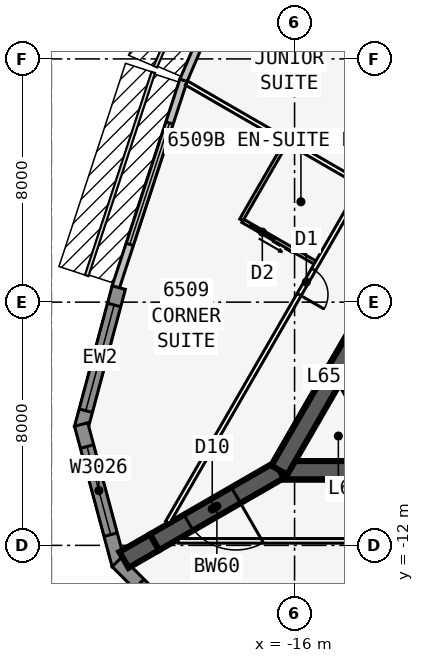
"""IFC4 building model, lengths in metres.
Left out: names, types, materials, properties, quantities, classifications, styles, units other than length and angle.
Written with IfcOpenShell. Run it as: python <this file> out.ifc"""

import sys

from ifc_helpers import new_model, si_unit, direction, frame, frame_2d, origin, place, context, subcontext, project, spatial, polyline, rectangle, outline, extrude, element, fill, save


model = new_model("IFC4")
c1 = context("Model", 3, precision=1e-05, world=origin(), true_north=direction((0.0, 1.0)))
c2 = subcontext(c1, "Body", "Model", "MODEL_VIEW")
j1 = project(units=[si_unit("LENGTHUNIT", "METRE"), si_unit("PLANEANGLEUNIT", "RADIAN")], contexts=[c1])
p1 = place(None, origin())
s1 = spatial("IfcSite", under=j1, at=p1, CompositionType="ELEMENT")
p2 = place(p1, origin())
s2 = spatial("IfcBuilding", under=s1, at=p2, CompositionType="ELEMENT")
p3 = place(p2, frame((0.0, 0.0, 246.5)))
s3 = spatial("IfcBuildingStorey", under=s2, at=p3, CompositionType="ELEMENT", Elevation=246.5)
p4 = place(p3, frame((-16.5, -9.526, 0.0), z_axis=(0.0, 0.0, 1.0), x_axis=(1.0, 0.0, 0.0)))
e1 = element("IfcWall", 1, at=p4, inside=s3, PredefinedType="SHEAR", context=c2, shape_type="SweptSolid", body=[
    extrude(rectangle(XDim=33.0, YDim=0.6, at=frame_2d((16.5, 0.0))), origin(), (0.0, 0.0, 1.0), 3.6),
])
p5 = place(p4, frame((14.05, 0.0, 0.0)))
e2 = element("IfcOpeningElement", 2, at=p5, cuts=e1, PredefinedType="OPENING", context=c2, shape_type="SweptSolid", body=[
    extrude(rectangle(XDim=1.8, YDim=2.13, at=frame_2d((0.9, 1.065))), frame((0.0, 0.31, 0.0), z_axis=(0.0, -1.0, 0.0), x_axis=(1.0, 0.0, 0.0)), (0.0, 0.0, 1.0), 0.62),
])
p6 = place(p3, frame((0.0, 19.052, 0.0), z_axis=(0.0, 0.0, 1.0), x_axis=(-0.499999749417, -0.866025548458, 0.0)))
e3 = element("IfcWall", 3, at=p6, inside=s3, PredefinedType="SHEAR", context=c2, shape_type="SweptSolid", body=[
    extrude(rectangle(XDim=33.0, YDim=0.6, at=frame_2d((16.5, 0.0))), origin(), (0.0, 0.0, 1.0), 3.6),
])
p7 = place(p6, frame((14.15, 0.0, 0.0)))
e4 = element("IfcOpeningElement", 4, at=p7, cuts=e3, PredefinedType="OPENING", context=c2, shape_type="SweptSolid", body=[
    extrude(rectangle(XDim=1.8, YDim=2.13, at=frame_2d((0.9, 1.065))), frame((0.0, 0.31, 0.0), z_axis=(0.0, -1.0, 0.0), x_axis=(1.0, 0.0, 0.0)), (0.0, 0.0, 1.0), 0.62),
])
p8 = place(p6, frame((12.6, 0.0, 0.0)))
e5 = element("IfcOpeningElement", 5, at=p8, cuts=e3, PredefinedType="OPENING", context=c2, shape_type="SweptSolid", body=[
    extrude(rectangle(XDim=1.0, YDim=2.13, at=frame_2d((0.5, 1.065))), frame((0.0, 0.31, 0.0), z_axis=(0.0, -1.0, 0.0), x_axis=(1.0, 0.0, 0.0)), (0.0, 0.0, 1.0), 0.62),
])
p9 = place(p3, frame((-16.5, -9.526, 0.0), z_axis=(0.0, 0.0, 1.0), x_axis=(-0.866031398331, -0.499989616998, 0.0)))
e6 = element("IfcWall", 6, at=p9, inside=s3, PredefinedType="SHEAR", context=c2, shape_type="SweptSolid", body=[
    extrude(rectangle(XDim=4.746, YDim=0.6, at=frame_2d((2.373, 0.0))), origin(), (0.0, 0.0, 1.0), 3.6),
])
p10 = place(p9, frame((1.65, 0.0, 0.0)))
e7 = element("IfcOpeningElement", 7, at=p10, cuts=e6, PredefinedType="OPENING", context=c2, shape_type="SweptSolid", body=[
    extrude(rectangle(XDim=1.8, YDim=2.13, at=frame_2d((0.9, 1.065))), frame((0.0, 0.31, 0.0), z_axis=(0.0, -1.0, 0.0), x_axis=(1.0, 0.0, 0.0)), (0.0, 0.0, 1.0), 0.62),
])
p11 = place(p3, frame((-20.61, -11.899, 0.0), z_axis=(0.0, 0.0, 1.0), x_axis=(-0.866009537788, -0.500027479704, 0.0)))
e8 = element("IfcWall", 8, at=p11, inside=s3, PredefinedType="SHEAR", context=c2, shape_type="SweptSolid", body=[
    extrude(rectangle(XDim=1.155, YDim=0.6, at=frame_2d((0.577, 0.0))), origin(), (0.0, 0.0, 1.0), 3.6),
])
p12 = place(p3, frame((-18.866, 5.136, 0.0), z_axis=(0.0, 0.0, 1.0), x_axis=(-0.393290226175, -0.91941437774, 0.0)))
e9 = element("IfcWall", 9, at=p12, inside=s3, PredefinedType="STANDARD", context=c2, shape_type="SweptSolid", body=[
    extrude(rectangle(XDim=2.014, YDim=0.25, at=frame_2d((1.007, 0.0))), origin(), (0.0, 0.0, 1.0), 3.435),
])
p13 = place(p3, frame((-19.654, 3.294, 0.0), z_axis=(0.0, 0.0, 1.0), x_axis=(-0.311328857048, -0.95030223759, 0.0)))
e10 = element("IfcWall", 10, at=p13, inside=s3, PredefinedType="STANDARD", context=c2, shape_type="SweptSolid", body=[
    extrude(rectangle(XDim=7.153, YDim=0.25, at=frame_2d((3.576, 0.0))), origin(), (0.0, 0.0, 1.0), 3.435),
])
p14 = place(p13, frame((1.476, 0.0, 0.45)))
e11 = element("IfcOpeningElement", 11, at=p14, cuts=e10, PredefinedType="OPENING", context=c2, shape_type="SweptSolid", body=[
    extrude(rectangle(XDim=4.2, YDim=2.6, at=frame_2d((2.1, 1.3))), frame((0.0, 0.135, 0.0), z_axis=(0.0, -1.0, 0.0), x_axis=(1.0, 0.0, 0.0)), (0.0, 0.0, 1.0), 0.27),
])
p15 = place(p3, frame((-21.783, -3.522, 0.0), z_axis=(0.0, 0.0, 1.0), x_axis=(-0.25880328844, -0.965930048136, 0.0)))
e12 = element("IfcWall", 12, at=p15, inside=s3, PredefinedType="SOLIDWALL", context=c2, shape_type="SweptSolid", body=[
    extrude(rectangle(XDim=4.782, YDim=0.45, at=frame_2d((2.391, 0.0))), origin(), (0.0, 0.0, 1.0), 3.435),
])
p16 = place(p15, frame((0.591, 0.0, 0.45)))
e13 = element("IfcOpeningElement", 13, at=p16, cuts=e12, PredefinedType="OPENING", context=c2, shape_type="SweptSolid", body=[
    extrude(rectangle(XDim=3.6, YDim=2.6, at=frame_2d((1.8, 1.3))), frame((0.0, 0.235, 0.0), z_axis=(0.0, -1.0, 0.0), x_axis=(1.0, 0.0, 0.0)), (0.0, 0.0, 1.0), 0.47),
])
p17 = place(p3, frame((-23.02, -8.025, 0.0), z_axis=(0.0, 0.0, 1.0), x_axis=(0.25880328844, -0.965930048136, 0.0)))
e14 = element("IfcWall", 14, at=p17, inside=s3, PredefinedType="SOLIDWALL", context=c2, shape_type="SweptSolid", body=[
    extrude(outline(polyline([(4.782, 0.225), (4.722, 0.225), (4.375, 0.132), (4.351, 0.225), (0.0, 0.225), (0.0, -0.225), (4.782, -0.225), (4.782, 0.225)])), origin(), (0.0, 0.0, 1.0), 3.435),
])
p18 = place(p17, frame((0.75, 0.0, 0.45)))
e15 = element("IfcOpeningElement", 15, at=p18, cuts=e14, PredefinedType="OPENING", context=c2, shape_type="SweptSolid", body=[
    extrude(rectangle(XDim=3.0, YDim=2.6, at=frame_2d((1.5, 1.3))), frame((0.0, 0.235, 0.0), z_axis=(0.0, -1.0, 0.0), x_axis=(1.0, 0.0, 0.0)), (0.0, 0.0, 1.0), 0.47),
])
p19 = place(p3, frame((-21.841, -12.542, 0.0), z_axis=(0.0, 0.0, 1.0), x_axis=(0.707081252484, -0.707132308968, 0.0)))
e16 = element("IfcWall", 16, at=p19, inside=s3, PredefinedType="SOLIDWALL", context=c2, shape_type="SweptSolid", body=[
    extrude(outline(polyline([(4.782, 0.225), (0.431, 0.225), (0.406, 0.132), (0.059, 0.225), (0.0, 0.225), (0.0, -0.225), (4.782, -0.225), (4.782, 0.225)])), origin(), (0.0, 0.0, 1.0), 3.435),
])
p20 = place(p19, frame((1.031, 0.0, 0.45)))
e17 = element("IfcOpeningElement", 17, at=p20, cuts=e16, PredefinedType="OPENING", context=c2, shape_type="SweptSolid", body=[
    extrude(rectangle(XDim=3.0, YDim=2.6, at=frame_2d((1.5, 1.3))), frame((0.0, 0.235, 0.0), z_axis=(0.0, -1.0, 0.0), x_axis=(1.0, 0.0, 0.0)), (0.0, 0.0, 1.0), 0.47),
])
p21 = place(p3, frame((-19.827, -11.851, 0.0), z_axis=(0.0, 0.0, 1.0), x_axis=(1.0, 0.0, 0.0)))
e18 = element("IfcWall", 18, at=p21, inside=s3, PredefinedType="PARTITIONING", context=c2, shape_type="SweptSolid", body=[
    extrude(rectangle(XDim=39.654, YDim=0.15, at=frame_2d((19.827, 0.0))), origin(), (0.0, 0.0, 1.0), 3.435),
])
p22 = place(p21, frame((8.652, 0.0, 0.0)))
e19 = element("IfcOpeningElement", 19, at=p22, cuts=e18, PredefinedType="OPENING", context=c2, shape_type="SweptSolid", body=[
    extrude(rectangle(XDim=0.95, YDim=2.13, at=frame_2d((0.475, 1.065))), frame((0.0, 0.085, 0.0), z_axis=(0.0, -1.0, 0.0), x_axis=(1.0, 0.0, 0.0)), (0.0, 0.0, 1.0), 0.17),
])
p23 = place(p21, frame((15.827, 0.0, 0.0)))
e20 = element("IfcOpeningElement", 20, at=p23, cuts=e18, PredefinedType="OPENING", context=c2, shape_type="SweptSolid", body=[
    extrude(rectangle(XDim=1.0, YDim=2.13, at=frame_2d((0.5, 1.065))), frame((0.0, 0.085, 0.0), z_axis=(0.0, -1.0, 0.0), x_axis=(1.0, 0.0, 0.0)), (0.0, 0.0, 1.0), 0.17),
])
p24 = place(p21, frame((23.052, 0.0, 0.0)))
e21 = element("IfcOpeningElement", 21, at=p24, cuts=e18, PredefinedType="OPENING", context=c2, shape_type="SweptSolid", body=[
    extrude(rectangle(XDim=0.95, YDim=2.13, at=frame_2d((0.475, 1.065))), frame((0.0, 0.085, 0.0), z_axis=(0.0, -1.0, 0.0), x_axis=(1.0, 0.0, 0.0)), (0.0, 0.0, 1.0), 0.17),
])
p25 = place(p21, frame((30.052, 0.0, 0.0)))
e22 = element("IfcOpeningElement", 22, at=p25, cuts=e18, PredefinedType="OPENING", context=c2, shape_type="SweptSolid", body=[
    extrude(rectangle(XDim=0.95, YDim=2.13, at=frame_2d((0.475, 1.065))), frame((0.0, 0.085, 0.0), z_axis=(0.0, -1.0, 0.0), x_axis=(1.0, 0.0, 0.0)), (0.0, 0.0, 1.0), 0.17),
])
p26 = place(p3, frame((-0.35, 23.096, 0.0), z_axis=(0.0, 0.0, 1.0), x_axis=(-0.499998875317, -0.866026053119, 0.0)))
e23 = element("IfcWall", 23, at=p26, inside=s3, PredefinedType="PARTITIONING", context=c2, shape_type="SweptSolid", body=[
    extrude(rectangle(XDim=39.654, YDim=0.15, at=frame_2d((19.827, 0.0))), origin(), (0.0, 0.0, 1.0), 3.435),
])
p27 = place(p26, frame((8.652, 0.0, 0.0)))
e24 = element("IfcOpeningElement", 24, at=p27, cuts=e23, PredefinedType="OPENING", context=c2, shape_type="SweptSolid", body=[
    extrude(rectangle(XDim=0.95, YDim=2.13, at=frame_2d((0.475, 1.065))), frame((0.0, 0.085, 0.0), z_axis=(0.0, -1.0, 0.0), x_axis=(1.0, 0.0, 0.0)), (0.0, 0.0, 1.0), 0.17),
])
p28 = place(p26, frame((16.052, 0.0, 0.0)))
e25 = element("IfcOpeningElement", 25, at=p28, cuts=e23, PredefinedType="OPENING", context=c2, shape_type="SweptSolid", body=[
    extrude(rectangle(XDim=0.95, YDim=2.13, at=frame_2d((0.475, 1.065))), frame((0.0, 0.085, 0.0), z_axis=(0.0, -1.0, 0.0), x_axis=(1.0, 0.0, 0.0)), (0.0, 0.0, 1.0), 0.17),
])
p29 = place(p26, frame((23.052, 0.0, 0.0)))
e26 = element("IfcOpeningElement", 26, at=p29, cuts=e23, PredefinedType="OPENING", context=c2, shape_type="SweptSolid", body=[
    extrude(rectangle(XDim=0.95, YDim=2.13, at=frame_2d((0.475, 1.065))), frame((0.0, 0.085, 0.0), z_axis=(0.0, -1.0, 0.0), x_axis=(1.0, 0.0, 0.0)), (0.0, 0.0, 1.0), 0.17),
])
p30 = place(p26, frame((30.052, 0.0, 0.0)))
e27 = element("IfcOpeningElement", 27, at=p30, cuts=e23, PredefinedType="OPENING", context=c2, shape_type="SweptSolid", body=[
    extrude(rectangle(XDim=0.95, YDim=2.13, at=frame_2d((0.475, 1.065))), frame((0.0, 0.085, 0.0), z_axis=(0.0, -1.0, 0.0), x_axis=(1.0, 0.0, 0.0)), (0.0, 0.0, 1.0), 0.17),
])
p31 = place(p3, frame((-13.829, -0.099, 0.0), z_axis=(0.0, 0.0, 1.0), x_axis=(-0.866022562216, 0.500004921708, 0.0)))
e28 = element("IfcWall", 28, at=p31, inside=s3, PredefinedType="PARTITIONING", context=c2, shape_type="SweptSolid", body=[
    extrude(rectangle(XDim=6.609, YDim=0.15, at=frame_2d((3.304, 0.0))), origin(), (0.0, 0.0, 1.0), 2.678),
])
p32 = place(p3, frame((-16.253, 1.301, 0.0), z_axis=(0.0, 0.0, 1.0), x_axis=(-0.499990139034, -0.866031096941, 0.0)))
e29 = element("IfcWall", 29, at=p32, inside=s3, PredefinedType="PLUMBINGWALL", context=c2, shape_type="SweptSolid", body=[
    extrude(rectangle(XDim=3.0, YDim=0.12, at=frame_2d((1.5, 0.0))), origin(), (0.0, 0.0, 1.0), 3.435),
])
p33 = place(p3, frame((-15.329, -2.697, 0.0), z_axis=(0.0, 0.0, 1.0), x_axis=(-0.866035715982, 0.499982138324, 0.0)))
e30 = element("IfcWall", 30, at=p33, inside=s3, PredefinedType="PLUMBINGWALL", context=c2, shape_type="SweptSolid", body=[
    extrude(rectangle(XDim=2.74, YDim=0.12, at=frame_2d((1.37, 0.0))), origin(), (0.0, 0.0, 1.0), 3.435),
])
p34 = place(p33, frame((1.55, 0.0, 0.0)))
e31 = element("IfcOpeningElement", 31, at=p34, cuts=e30, PredefinedType="OPENING", context=c2, shape_type="SweptSolid", body=[
    extrude(rectangle(XDim=0.9, YDim=2.13, at=frame_2d((0.45, 1.065))), frame((0.0, 0.07, 0.0), z_axis=(0.0, -1.0, 0.0), x_axis=(1.0, 0.0, 0.0)), (0.0, 0.0, 1.0), 0.14),
])
p35 = place(p3, frame((-12.978, -9.226, 0.0), z_axis=(0.0, 0.0, 1.0), x_axis=(-0.499952404951, 0.866052881055, 0.0)))
e32 = element("IfcWall", 32, at=p35, inside=s3, PredefinedType="SOLIDWALL", context=c2, shape_type="SweptSolid", body=[
    extrude(rectangle(XDim=3.002, YDim=0.2, at=frame_2d((1.501, 0.0))), origin(), (0.0, 0.0, 1.0), 3.435),
])
p36 = place(p14, origin())
e33 = element("IfcWindow", 33, at=p36, inside=s3, PartitioningType="SINGLE_PANEL", PredefinedType="WINDOW", context=c2, shape_type="SweptSolid", body=[
    extrude(rectangle(XDim=4.2, YDim=2.6, at=frame_2d((2.1, 1.3))), frame((0.0, 0.03, 0.0), z_axis=(0.0, -1.0, 0.0), x_axis=(1.0, 0.0, 0.0)), (0.0, 0.0, 1.0), 0.06),
])
fill(e11, e33)
p37 = place(p16, origin())
e34 = element("IfcWindow", 34, at=p37, inside=s3, PartitioningType="SINGLE_PANEL", PredefinedType="WINDOW", context=c2, shape_type="SweptSolid", body=[
    extrude(rectangle(XDim=3.6, YDim=2.6, at=frame_2d((1.8, 1.3))), frame((0.0, 0.03, 0.0), z_axis=(0.0, -1.0, 0.0), x_axis=(1.0, 0.0, 0.0)), (0.0, 0.0, 1.0), 0.06),
])
fill(e13, e34)
p38 = place(p18, origin())
e35 = element("IfcWindow", 35, at=p38, inside=s3, PartitioningType="SINGLE_PANEL", PredefinedType="WINDOW", context=c2, shape_type="SweptSolid", body=[
    extrude(rectangle(XDim=3.0, YDim=2.6, at=frame_2d((1.5, 1.3))), frame((0.0, 0.03, 0.0), z_axis=(0.0, -1.0, 0.0), x_axis=(1.0, 0.0, 0.0)), (0.0, 0.0, 1.0), 0.06),
])
fill(e15, e35)
p39 = place(p20, origin())
e36 = element("IfcWindow", 36, at=p39, inside=s3, PartitioningType="SINGLE_PANEL", PredefinedType="WINDOW", context=c2, shape_type="SweptSolid", body=[
    extrude(rectangle(XDim=3.0, YDim=2.6, at=frame_2d((1.5, 1.3))), frame((0.0, 0.03, 0.0), z_axis=(0.0, -1.0, 0.0), x_axis=(1.0, 0.0, 0.0)), (0.0, 0.0, 1.0), 0.06),
])
fill(e17, e36)
p40 = place(p34, origin())
e37 = element("IfcDoor", 37, at=p40, inside=s3, OperationType="SLIDING_TO_LEFT", PredefinedType="DOOR", context=c2, shape_type="SweptSolid", body=[
    extrude(rectangle(XDim=0.9, YDim=2.13, at=frame_2d((0.45, 1.065))), frame((0.0, 0.025, 0.0), z_axis=(0.0, -1.0, 0.0), x_axis=(1.0, 0.0, 0.0)), (0.0, 0.0, 1.0), 0.05),
])
fill(e31, e37)
p41 = place(p30, origin())
e38 = element("IfcDoor", 38, at=p41, inside=s3, OperationType="SINGLE_SWING_RIGHT", PredefinedType="DOOR", context=c2, shape_type="SweptSolid", body=[
    extrude(rectangle(XDim=0.95, YDim=2.13, at=frame_2d((0.475, 1.065))), frame((0.0, 0.025, 0.0), z_axis=(0.0, -1.0, 0.0), x_axis=(1.0, 0.0, 0.0)), (0.0, 0.0, 1.0), 0.05),
])
fill(e27, e38)
p42 = place(p10, origin())
e39 = element("IfcDoor", 39, at=p42, inside=s3, OperationType="DOUBLE_DOOR_DOUBLE_SWING", PredefinedType="DOOR", context=c2, shape_type="SweptSolid", body=[
    extrude(rectangle(XDim=1.8, YDim=2.13, at=frame_2d((0.9, 1.065))), frame((0.0, 0.025, 0.0), z_axis=(0.0, -1.0, 0.0), x_axis=(1.0, 0.0, 0.0)), (0.0, 0.0, 1.0), 0.05),
])
fill(e7, e39)
save(model, sys.argv[1])
